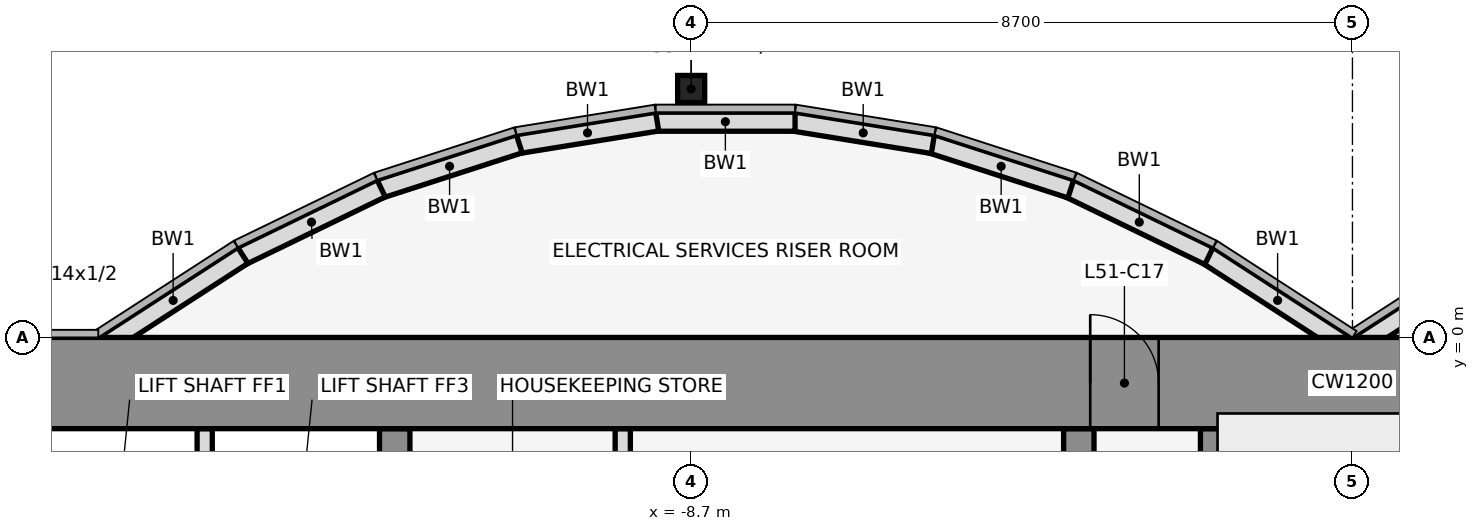
"""IFC4 building model, lengths in metres.
Left out: names, types, materials, properties, quantities, classifications, styles, units other than length and angle.
Written with IfcOpenShell. Run it as: python <this file> out.ifc"""

import sys

from ifc_helpers import new_model, si_unit, direction, frame, frame_2d, origin, origin_2d, place, context, subcontext, project, spatial, rectangle, hollow_rectangle, extrude, element, fill, save


model = new_model("IFC4")
c1 = context("Model", 3, precision=1e-05, world=origin(), true_north=direction((0.0, 1.0)))
c2 = subcontext(c1, "Body", "Model", "MODEL_VIEW")
j1 = project(units=[si_unit("LENGTHUNIT", "METRE"), si_unit("PLANEANGLEUNIT", "RADIAN")], contexts=[c1])
p1 = place(None, origin())
s1 = spatial("IfcSite", under=j1, at=p1, CompositionType="ELEMENT")
p2 = place(p1, origin())
s2 = spatial("IfcBuilding", under=s1, at=p2, CompositionType="ELEMENT")
p3 = place(p2, frame((0.0, 0.0, 227.8)))
s3 = spatial("IfcBuildingStorey", under=s2, at=p3, CompositionType="ELEMENT", Elevation=227.8)
p4 = place(p3, frame((-8.7, 3.269, 0.0), z_axis=(0.0, 0.0, 1.0), x_axis=(1.0, 0.0, 0.0)))
e1 = element("IfcColumn", 1, at=p4, inside=s3, PredefinedType="COLUMN", context=c2, shape_type="SweptSolid", body=[
    extrude(hollow_rectangle(XDim=0.356, YDim=0.356, WallThickness=0.012, at=origin_2d()), origin(), (0.0, 0.0, 1.0), 4.1),
])
for number, where, z_axis, x_axis in (
    (2, (1.901, 1.08, 0.0), (0.0, 0.0, 1.0), (-0.84, -0.543, 0.0)),
    (3, (-0.068, -0.105, 0.0), (0.0, 0.0, 1.0), (-0.84, 0.543, 0.0)),
):
    element("IfcWall", number, at=place(p3, frame(where, z_axis=z_axis, x_axis=x_axis)), inside=s3, PredefinedType="STANDARD", context=c2, shape_type="SweptSolid", body=[
        extrude(rectangle(XDim=2.183, YDim=0.25, at=frame_2d((1.091, 0.0))), origin(), (0.0, 0.0, 1.0), 3.95),
    ])
p5 = place(p3, frame((-1.888, 1.073, 0.0), z_axis=(0.0, 0.0, 1.0), x_axis=(-0.89982408427, 0.436252928206, 0.0)))
e4 = element("IfcWall", 4, at=p5, inside=s3, PredefinedType="STANDARD", context=c2, shape_type="SweptSolid", body=[
    extrude(rectangle(XDim=2.038, YDim=0.25, at=frame_2d((1.019, 0.0))), origin(), (0.0, 0.0, 1.0), 3.95),
])
p6 = place(p3, frame((-3.705, 1.955, 0.0), z_axis=(0.0, 0.0, 1.0), x_axis=(-0.951495806175, 0.307661714928, 0.0)))
e5 = element("IfcWall", 5, at=p6, inside=s3, PredefinedType="STANDARD", context=c2, shape_type="SweptSolid", body=[
    extrude(rectangle(XDim=1.927, YDim=0.25, at=frame_2d((0.963, 0.0))), origin(), (0.0, 0.0, 1.0), 3.95),
])
p7 = place(p3, frame((-5.52, 2.543, 0.0), z_axis=(0.0, 0.0, 1.0), x_axis=(-0.987181718931, 0.159600293885, 0.0)))
e6 = element("IfcWall", 6, at=p7, inside=s3, PredefinedType="STANDARD", context=c2, shape_type="SweptSolid", body=[
    extrude(rectangle(XDim=1.857, YDim=0.25, at=frame_2d((0.929, 0.0))), origin(), (0.0, 0.0, 1.0), 3.95),
])
p8 = place(p3, frame((-7.333, 2.838, 0.0), z_axis=(0.0, 0.0, 1.0), x_axis=(-1.0, 0.0, 0.0)))
e7 = element("IfcWall", 7, at=p8, inside=s3, PredefinedType="STANDARD", context=c2, shape_type="SweptSolid", body=[
    extrude(rectangle(XDim=1.833, YDim=0.25, at=frame_2d((0.917, 0.0))), origin(), (0.0, 0.0, 1.0), 3.95),
])
p9 = place(p3, frame((-9.147, 2.84, 0.0), z_axis=(0.0, 0.0, 1.0), x_axis=(-0.987181718931, -0.159600293885, 0.0)))
e8 = element("IfcWall", 8, at=p9, inside=s3, PredefinedType="STANDARD", context=c2, shape_type="SweptSolid", body=[
    extrude(rectangle(XDim=1.857, YDim=0.25, at=frame_2d((0.929, 0.0))), origin(), (0.0, 0.0, 1.0), 3.95),
])
p10 = place(p3, frame((-10.962, 2.548, 0.0), z_axis=(0.0, 0.0, 1.0), x_axis=(-0.951495806175, -0.307661714928, 0.0)))
e9 = element("IfcWall", 9, at=p10, inside=s3, PredefinedType="STANDARD", context=c2, shape_type="SweptSolid", body=[
    extrude(rectangle(XDim=1.927, YDim=0.25, at=frame_2d((0.963, 0.0))), origin(), (0.0, 0.0, 1.0), 3.95),
])
p11 = place(p3, frame((-12.779, 1.962, 0.0), z_axis=(0.0, 0.0, 1.0), x_axis=(-0.89982408427, -0.436252928206, 0.0)))
e10 = element("IfcWall", 10, at=p11, inside=s3, PredefinedType="STANDARD", context=c2, shape_type="SweptSolid", body=[
    extrude(rectangle(XDim=2.038, YDim=0.25, at=frame_2d((1.019, 0.0))), origin(), (0.0, 0.0, 1.0), 3.95),
])
p12 = place(p3, frame((-14.599, 1.08, 0.0), z_axis=(0.0, 0.0, 1.0), x_axis=(-0.83981312244, -0.542875602121, 0.0)))
e11 = element("IfcWall", 11, at=p12, inside=s3, PredefinedType="STANDARD", context=c2, shape_type="SweptSolid", body=[
    extrude(rectangle(XDim=2.183, YDim=0.25, at=frame_2d((1.091, 0.0))), origin(), (0.0, 0.0, 1.0), 3.95),
])
p13 = place(p3, frame((-15.1, -4.6, 0.0), z_axis=(0.0, 0.0, 1.0), x_axis=(0.0, 1.0, 0.0)))
e12 = element("IfcWall", 12, at=p13, inside=s3, PredefinedType="PARTITIONING", context=c2, shape_type="SweptSolid", body=[
    extrude(rectangle(XDim=3.4, YDim=0.2, at=frame_2d((1.7, 0.0))), origin(), (0.0, 0.0, 1.0), 2.84),
])
p14 = place(p3, frame((-12.6, -11.8, 0.0), z_axis=(0.0, 0.0, 1.0), x_axis=(0.0, 1.0, 0.0)))
e13 = element("IfcWall", 13, at=p14, inside=s3, PredefinedType="SHEAR", context=c2, shape_type="SweptSolid", body=[
    extrude(rectangle(XDim=10.6, YDim=0.4, at=frame_2d((5.3, 0.0))), origin(), (0.0, 0.0, 1.0), 4.1),
])
p15 = place(p14, frame((4.75, 0.0, 0.0)))
e14 = element("IfcOpeningElement", 14, at=p15, cuts=e13, PredefinedType="OPENING", context=c2, shape_type="SweptSolid", body=[
    extrude(rectangle(XDim=1.1, YDim=2.1, at=frame_2d((0.55, 1.05))), frame((0.0, 0.212, 0.0), z_axis=(0.0, -1.0, 0.0), x_axis=(1.0, 0.0, 0.0)), (0.0, 0.0, 1.0), 0.424),
])
p16 = place(p3, frame((-9.6, -4.6, 0.0), z_axis=(0.0, 0.0, 1.0), x_axis=(0.0, 1.0, 0.0)))
e15 = element("IfcWall", 15, at=p16, inside=s3, PredefinedType="PARTITIONING", context=c2, shape_type="SweptSolid", body=[
    extrude(rectangle(XDim=3.4, YDim=0.2, at=frame_2d((1.7, 0.0))), origin(), (0.0, 0.0, 1.0), 2.84),
])
p17 = place(p3, frame((-3.6, -11.8, 0.0), z_axis=(0.0, 0.0, 1.0), x_axis=(0.0, 1.0, 0.0)))
e16 = element("IfcWall", 16, at=p17, inside=s3, PredefinedType="SHEAR", context=c2, shape_type="SweptSolid", body=[
    extrude(rectangle(XDim=10.6, YDim=0.4, at=frame_2d((5.3, 0.0))), origin(), (0.0, 0.0, 1.0), 4.1),
])
p18 = place(p17, frame((4.85, 0.0, 0.0)))
e17 = element("IfcOpeningElement", 17, at=p18, cuts=e16, PredefinedType="OPENING", context=c2, shape_type="SweptSolid", body=[
    extrude(rectangle(XDim=0.9, YDim=2.1, at=frame_2d((0.45, 1.05))), frame((0.0, 0.212, 0.0), z_axis=(0.0, -1.0, 0.0), x_axis=(1.0, 0.0, 0.0)), (0.0, 0.0, 1.0), 0.424),
])
p19 = place(p3, frame((-1.8, -11.8, 0.0), z_axis=(0.0, 0.0, 1.0), x_axis=(0.0, 1.0, 0.0)))
e18 = element("IfcWall", 18, at=p19, inside=s3, PredefinedType="SHEAR", context=c2, shape_type="SweptSolid", body=[
    extrude(rectangle(XDim=10.6, YDim=0.4, at=frame_2d((5.3, 0.0))), origin(), (0.0, 0.0, 1.0), 4.1),
])
p20 = place(p3, frame((-22.0, -0.6, 0.0), z_axis=(0.0, 0.0, 1.0), x_axis=(1.0, 0.0, 0.0)))
e19 = element("IfcWall", 19, at=p20, inside=s3, PredefinedType="SHEAR", context=c2, shape_type="SweptSolid", body=[
    extrude(rectangle(XDim=44.0, YDim=1.2, at=frame_2d((22.0, 0.0))), origin(), (0.0, 0.0, 1.0), 4.1),
])
p21 = place(p20, frame((18.55, 0.0, 0.0)))
e20 = element("IfcOpeningElement", 20, at=p21, cuts=e19, PredefinedType="OPENING", context=c2, shape_type="SweptSolid", body=[
    extrude(rectangle(XDim=0.9, YDim=2.1, at=frame_2d((0.45, 1.05))), frame((0.0, 0.612, 0.0), z_axis=(0.0, -1.0, 0.0), x_axis=(1.0, 0.0, 0.0)), (0.0, 0.0, 1.0), 1.224),
])
p22 = place(p20, frame((24.55, 0.0, 0.0)))
e21 = element("IfcOpeningElement", 21, at=p22, cuts=e19, PredefinedType="OPENING", context=c2, shape_type="SweptSolid", body=[
    extrude(rectangle(XDim=0.9, YDim=2.1, at=frame_2d((0.45, 1.05))), frame((0.0, 0.612, 0.0), z_axis=(0.0, -1.0, 0.0), x_axis=(1.0, 0.0, 0.0)), (0.0, 0.0, 1.0), 1.224),
])
p23 = place(p21, origin())
e22 = element("IfcDoor", 22, at=p23, inside=s3, OperationType="SINGLE_SWING_LEFT", PredefinedType="DOOR", context=c2, shape_type="SweptSolid", body=[
    extrude(rectangle(XDim=0.9, YDim=2.1, at=frame_2d((0.45, 1.05))), frame((0.0, 0.025, 0.0), z_axis=(0.0, -1.0, 0.0), x_axis=(1.0, 0.0, 0.0)), (0.0, 0.0, 1.0), 0.05),
])
fill(e20, e22)
save(model, sys.argv[1])
